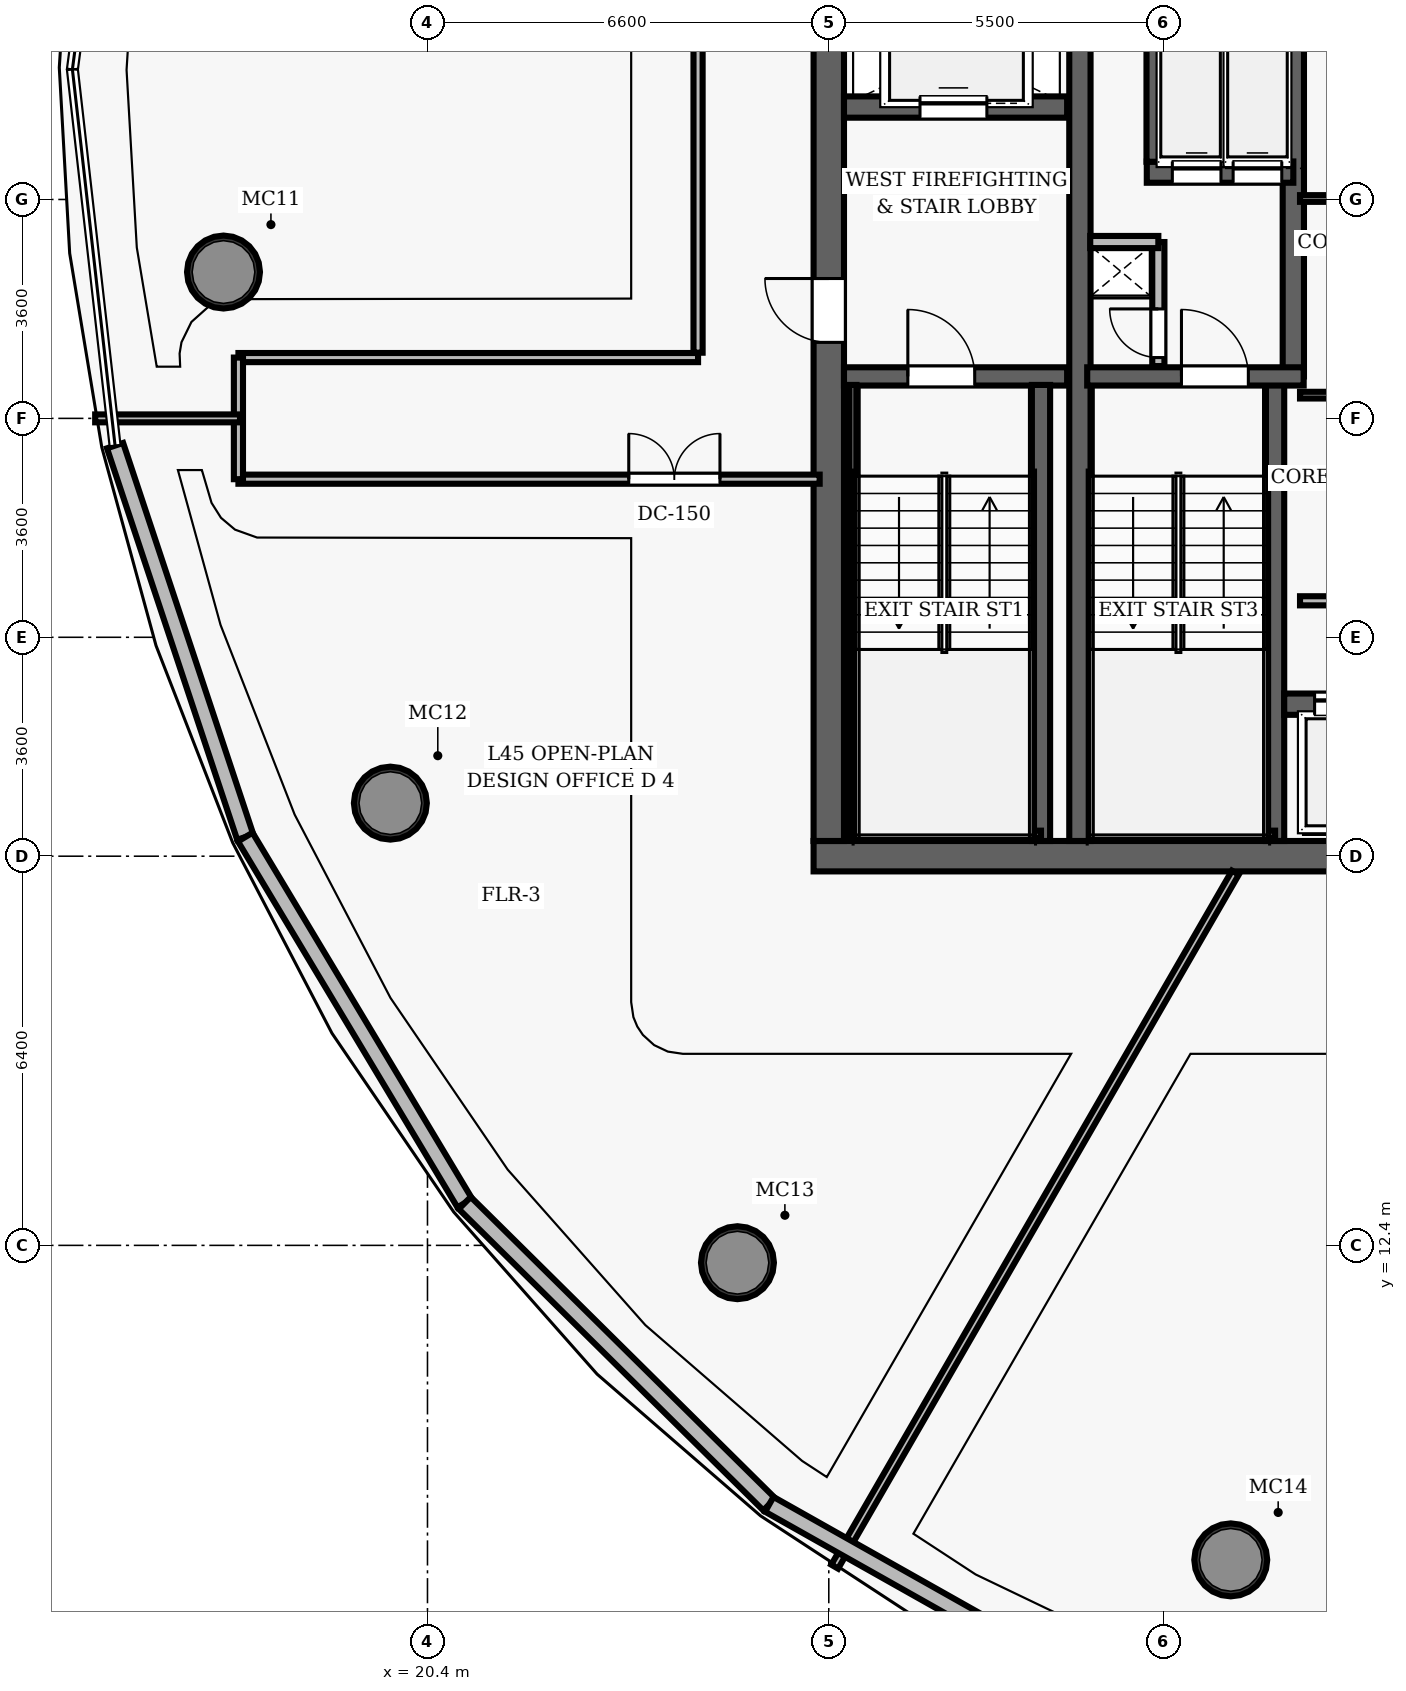
"""IFC4 building model, lengths in metres.
Left out: names, types, materials, properties, quantities, classifications, styles, units other than length and angle.
Written with IfcOpenShell. Run it as: python <this file> out.ifc"""

import sys

from ifc_helpers import new_model, si_unit, direction, frame, frame_2d, origin, origin_2d, place, context, subcontext, project, spatial, rectangle, hollow_circle, extrude, element, fill, save


model = new_model("IFC4")
c1 = context("Model", 3, precision=1e-05, world=origin(), true_north=direction((0.0, 1.0)))
c2 = subcontext(c1, "Body", "Model", "MODEL_VIEW")
j1 = project(units=[si_unit("LENGTHUNIT", "METRE"), si_unit("PLANEANGLEUNIT", "RADIAN")], contexts=[c1])
p1 = place(None, origin())
s1 = spatial("IfcSite", under=j1, at=p1, CompositionType="ELEMENT")
p2 = place(p1, origin())
s2 = spatial("IfcBuilding", under=s1, at=p2, CompositionType="ELEMENT")
p3 = place(p2, frame((0.0, 0.0, 178.9)))
s3 = spatial("IfcBuildingStorey", under=s2, at=p3, CompositionType="ELEMENT", Elevation=178.9)
p4 = place(p3, frame((26.75, 18.8, 0.0), z_axis=(0.0, 0.0, 1.0), x_axis=(1.0, 0.0, 0.0)))
e1 = element("IfcWall", 1, at=p4, inside=s3, PredefinedType="SHEAR", context=c2, shape_type="SweptSolid", body=[
    extrude(rectangle(XDim=22.5, YDim=0.5, at=frame_2d((11.25, 0.0))), origin(), (0.0, 0.0, 1.0), 3.85),
])
p5 = place(p4, frame((14.47, 0.0, 0.0)))
e2 = element("IfcOpeningElement", 2, at=p5, cuts=e1, PredefinedType="OPENING", context=c2, shape_type="SweptSolid", body=[
    extrude(rectangle(XDim=1.05, YDim=2.15, at=frame_2d((0.525, 1.075))), frame((0.0, 0.26, 0.0), z_axis=(0.0, -1.0, 0.0), x_axis=(1.0, 0.0, 0.0)), (0.0, 0.0, 1.0), 0.52),
])
p6 = place(p3, frame((27.0, 19.05, 0.0), z_axis=(0.0, 0.0, 1.0), x_axis=(0.0, 1.0, 0.0)))
e3 = element("IfcWall", 3, at=p6, inside=s3, PredefinedType="SHEAR", context=c2, shape_type="SweptSolid", body=[
    extrude(rectangle(XDim=13.9, YDim=0.5, at=frame_2d((6.95, 0.0))), origin(), (0.0, 0.0, 1.0), 3.85),
])
p7 = place(p6, frame((8.2, 0.0, 0.0)))
e4 = element("IfcOpeningElement", 4, at=p7, cuts=e3, PredefinedType="OPENING", context=c2, shape_type="SweptSolid", body=[
    extrude(rectangle(XDim=1.05, YDim=2.15, at=frame_2d((0.525, 1.075))), frame((0.0, 0.26, 0.0), z_axis=(0.0, -1.0, 0.0), x_axis=(1.0, 0.0, 0.0)), (0.0, 0.0, 1.0), 0.52),
])
p8 = place(p3, frame((31.13, 19.05, 0.0), z_axis=(0.0, 0.0, 1.0), x_axis=(0.0, 1.0, 0.0)))
e5 = element("IfcWall", 5, at=p8, inside=s3, PredefinedType="SHEAR", context=c2, shape_type="SweptSolid", body=[
    extrude(rectangle(XDim=13.9, YDim=0.35, at=frame_2d((6.95, 0.0))), origin(), (0.0, 0.0, 1.0), 3.85),
])
for number, where, z_axis, x_axis in (
    (6, (17.045, 28.406, 0.0), (0.0, 0.0, 1.0), (1.0, 0.0, 0.0)),
    (7, (19.79, 19.673, 0.0), (0.0, 0.0, 1.0), (1.0, 0.0, 0.0)),
    (8, (25.498, 12.115, 0.0), (0.0, 0.0, 1.0), (1.0, 0.0, 0.0)),
    (9, (33.611, 7.228, 0.0), (0.0, 0.0, 1.0), (1.0, 0.0, 0.0)),
):
    element("IfcColumn", number, at=place(p3, frame(where, z_axis=z_axis, x_axis=x_axis)), inside=s3, PredefinedType="COLUMN", context=c2, shape_type="SweptSolid", body=[
        extrude(hollow_circle(Radius=0.6, WallThickness=0.05, at=origin_2d()), origin(), (0.0, 0.0, 1.0), 3.85),
    ])
p9 = place(p3, frame((27.25, 26.69, 0.0), z_axis=(0.0, 0.0, 1.0), x_axis=(1.0, 0.0, 0.0)))
e10 = element("IfcWall", 10, at=p9, inside=s3, PredefinedType="SHEAR", context=c2, shape_type="SweptSolid", body=[
    extrude(rectangle(XDim=3.67, YDim=0.3, at=frame_2d((1.835, 0.0))), origin(), (0.0, 0.0, 1.0), 3.85),
])
p10 = place(p9, frame((1.05, 0.0, 0.0)))
e11 = element("IfcOpeningElement", 11, at=p10, cuts=e10, PredefinedType="OPENING", context=c2, shape_type="SweptSolid", body=[
    extrude(rectangle(XDim=1.1, YDim=2.15, at=frame_2d((0.55, 1.075))), frame((0.0, 0.16, 0.0), z_axis=(0.0, -1.0, 0.0), x_axis=(1.0, 0.0, 0.0)), (0.0, 0.0, 1.0), 0.32),
])
p11 = place(p3, frame((30.49, 19.05, 0.0), z_axis=(0.0, 0.0, 1.0), x_axis=(0.0, 1.0, 0.0)))
e12 = element("IfcWall", 12, at=p11, inside=s3, PredefinedType="SHEAR", context=c2, shape_type="SweptSolid", body=[
    extrude(rectangle(XDim=7.5, YDim=0.3, at=frame_2d((3.75, 0.0))), origin(), (0.0, 0.0, 1.0), 3.85),
])
p12 = place(p3, frame((27.395, 19.1, 0.0), z_axis=(0.0, 0.0, 1.0), x_axis=(0.0, 1.0, 0.0)))
e13 = element("IfcWall", 13, at=p12, inside=s3, PredefinedType="SHEAR", context=c2, shape_type="SweptSolid", body=[
    extrude(rectangle(XDim=7.45, YDim=0.12, at=frame_2d((3.725, 0.0))), origin(), (0.0, 0.0, 1.0), 3.85),
])
p13 = place(p3, frame((27.395, 19.16, 0.0), z_axis=(0.0, 0.0, 1.0), x_axis=(1.0, 0.0, 0.0)))
e14 = element("IfcWall", 14, at=p13, inside=s3, PredefinedType="SHEAR", context=c2, shape_type="SweptSolid", body=[
    extrude(rectangle(XDim=3.095, YDim=0.12, at=frame_2d((1.547, 0.0))), origin(), (0.0, 0.0, 1.0), 3.85),
])
p14 = place(p3, frame((27.25, 31.12, 0.0), z_axis=(0.0, 0.0, 1.0), x_axis=(1.0, 0.0, 0.0)))
e15 = element("IfcWall", 15, at=p14, inside=s3, PredefinedType="SHEAR", context=c2, shape_type="SweptSolid", body=[
    extrude(rectangle(XDim=3.67, YDim=0.35, at=frame_2d((1.835, 0.0))), origin(), (0.0, 0.0, 1.0), 3.035),
])
p15 = place(p14, frame((1.25, 0.0, 0.0)))
e16 = element("IfcOpeningElement", 16, at=p15, cuts=e15, PredefinedType="OPENING", context=c2, shape_type="SweptSolid", body=[
    extrude(rectangle(XDim=1.1, YDim=2.15, at=frame_2d((0.55, 1.075))), frame((0.0, 0.185, 0.0), z_axis=(0.0, -1.0, 0.0), x_axis=(1.0, 0.0, 0.0)), (0.0, 0.0, 1.0), 0.37),
])
p16 = place(p3, frame((34.34, 19.05, 0.0), z_axis=(0.0, 0.0, 1.0), x_axis=(0.0, 1.0, 0.0)))
e17 = element("IfcWall", 17, at=p16, inside=s3, PredefinedType="SHEAR", context=c2, shape_type="SweptSolid", body=[
    extrude(rectangle(XDim=7.5, YDim=0.3, at=frame_2d((3.75, 0.0))), origin(), (0.0, 0.0, 1.0), 3.85),
])
p17 = place(p3, frame((34.64, 26.69, 0.0), z_axis=(0.0, 0.0, 1.0), x_axis=(0.0, 1.0, 0.0)))
e18 = element("IfcWall", 18, at=p17, inside=s3, PredefinedType="SHEAR", context=c2, shape_type="SweptSolid", body=[
    extrude(rectangle(XDim=6.26, YDim=0.35, at=frame_2d((3.13, 0.0))), origin(), (0.0, 0.0, 1.0), 3.85),
])
p18 = place(p3, frame((31.25, 26.69, 0.0), z_axis=(0.0, 0.0, 1.0), x_axis=(1.0, 0.0, 0.0)))
e19 = element("IfcWall", 19, at=p18, inside=s3, PredefinedType="SHEAR", context=c2, shape_type="SweptSolid", body=[
    extrude(rectangle(XDim=3.56, YDim=0.3, at=frame_2d((1.78, 0.0))), origin(), (0.0, 0.0, 1.0), 3.85),
])
p19 = place(p18, frame((1.55, 0.0, 0.0)))
e20 = element("IfcOpeningElement", 20, at=p19, cuts=e19, PredefinedType="OPENING", context=c2, shape_type="SweptSolid", body=[
    extrude(rectangle(XDim=1.1, YDim=2.15, at=frame_2d((0.55, 1.075))), frame((0.0, 0.16, 0.0), z_axis=(0.0, -1.0, 0.0), x_axis=(1.0, 0.0, 0.0)), (0.0, 0.0, 1.0), 0.32),
])
p20 = place(p3, frame((31.3, 19.16, 0.0), z_axis=(0.0, 0.0, 1.0), x_axis=(1.0, 0.0, 0.0)))
e21 = element("IfcWall", 21, at=p20, inside=s3, PredefinedType="SHEAR", context=c2, shape_type="SweptSolid", body=[
    extrude(rectangle(XDim=3.04, YDim=0.12, at=frame_2d((1.52, 0.0))), origin(), (0.0, 0.0, 1.0), 3.85),
])
p21 = place(p3, frame((32.23, 30.05, 0.0), z_axis=(0.0, 0.0, 1.0), x_axis=(1.0, 0.0, 0.0)))
e22 = element("IfcWall", 22, at=p21, inside=s3, PredefinedType="SHEAR", context=c2, shape_type="SweptSolid", body=[
    extrude(rectangle(XDim=2.41, YDim=0.35, at=frame_2d((1.205, 0.0))), origin(), (0.0, 0.0, 1.0), 3.035),
])
p22 = place(p21, frame((0.42, 0.0, 0.0)))
e23 = element("IfcOpeningElement", 23, at=p22, cuts=e22, PredefinedType="OPENING", context=c2, shape_type="SweptSolid", body=[
    extrude(rectangle(XDim=0.8, YDim=2.15, at=frame_2d((0.4, 1.075))), frame((0.0, 0.185, 0.0), z_axis=(0.0, -1.0, 0.0), x_axis=(1.0, 0.0, 0.0)), (0.0, 0.0, 1.0), 0.37),
])
p23 = place(p21, frame((1.42, 0.0, 0.0)))
e24 = element("IfcOpeningElement", 24, at=p23, cuts=e22, PredefinedType="OPENING", context=c2, shape_type="SweptSolid", body=[
    extrude(rectangle(XDim=0.8, YDim=2.15, at=frame_2d((0.4, 1.075))), frame((0.0, 0.185, 0.0), z_axis=(0.0, -1.0, 0.0), x_axis=(1.0, 0.0, 0.0)), (0.0, 0.0, 1.0), 0.37),
])
p24 = place(p3, frame((32.4, 30.22, 0.0), z_axis=(0.0, 0.0, 1.0), x_axis=(0.0, 1.0, 0.0)))
e25 = element("IfcWall", 25, at=p24, inside=s3, PredefinedType="SHEAR", context=c2, shape_type="SweptSolid", body=[
    extrude(rectangle(XDim=2.73, YDim=0.35, at=frame_2d((1.365, 0.0))), origin(), (0.0, 0.0, 1.0), 3.035),
])
p25 = place(p3, frame((32.42, 26.86, 0.0), z_axis=(0.0, 0.0, 1.0), x_axis=(0.0, 1.0, 0.0)))
e26 = element("IfcWall", 26, at=p25, inside=s3, PredefinedType="PARTITIONING", context=c2, shape_type="SweptSolid", body=[
    extrude(rectangle(XDim=2.04, YDim=0.2, at=frame_2d((1.02, 0.0))), origin(), (0.0, 0.0, 1.0), 3.035),
])
p26 = place(p25, frame((0.14, 0.0, 0.0)))
e27 = element("IfcOpeningElement", 27, at=p26, cuts=e26, PredefinedType="OPENING", context=c2, shape_type="SweptSolid", body=[
    extrude(rectangle(XDim=0.8, YDim=2.05, at=frame_2d((0.4, 1.025))), frame((0.0, 0.11, 0.0), z_axis=(0.0, -1.0, 0.0), x_axis=(1.0, 0.0, 0.0)), (0.0, 0.0, 1.0), 0.22),
])
p27 = place(p3, frame((31.3, 28.9, 0.0), z_axis=(0.0, 0.0, 1.0), x_axis=(1.0, 0.0, 0.0)))
e28 = element("IfcWall", 28, at=p27, inside=s3, PredefinedType="PARTITIONING", context=c2, shape_type="SweptSolid", body=[
    extrude(rectangle(XDim=1.12, YDim=0.2, at=frame_2d((0.56, 0.0))), origin(), (0.0, 0.0, 1.0), 3.035),
])
p28 = place(p3, frame((34.49, 21.3, 0.0), z_axis=(0.0, 0.0, 1.0), x_axis=(1.0, 0.0, 0.0)))
e29 = element("IfcWall", 29, at=p28, inside=s3, PredefinedType="SHEAR", context=c2, shape_type="SweptSolid", body=[
    extrude(rectangle(XDim=6.68, YDim=0.35, at=frame_2d((3.34, 0.0))), origin(), (0.0, 0.0, 1.0), 3.035),
])
p29 = place(p28, frame((0.5, 0.0, 0.0)))
e30 = element("IfcOpeningElement", 30, at=p29, cuts=e29, PredefinedType="OPENING", context=c2, shape_type="SweptSolid", body=[
    extrude(rectangle(XDim=0.9, YDim=2.15, at=frame_2d((0.45, 1.075))), frame((0.0, 0.185, 0.0), z_axis=(0.0, -1.0, 0.0), x_axis=(1.0, 0.0, 0.0)), (0.0, 0.0, 1.0), 0.37),
])
p30 = place(p28, frame((2.58, 0.0, 0.0)))
e31 = element("IfcOpeningElement", 31, at=p30, cuts=e29, PredefinedType="OPENING", context=c2, shape_type="SweptSolid", body=[
    extrude(rectangle(XDim=0.9, YDim=2.15, at=frame_2d((0.45, 1.075))), frame((0.0, 0.185, 0.0), z_axis=(0.0, -1.0, 0.0), x_axis=(1.0, 0.0, 0.0)), (0.0, 0.0, 1.0), 0.37),
])
p31 = place(p28, frame((4.66, 0.0, 0.0)))
e32 = element("IfcOpeningElement", 32, at=p31, cuts=e29, PredefinedType="OPENING", context=c2, shape_type="SweptSolid", body=[
    extrude(rectangle(XDim=0.9, YDim=2.15, at=frame_2d((0.45, 1.075))), frame((0.0, 0.185, 0.0), z_axis=(0.0, -1.0, 0.0), x_axis=(1.0, 0.0, 0.0)), (0.0, 0.0, 1.0), 0.37),
])
p32 = place(p3, frame((34.75, 23.0, 0.0), z_axis=(0.0, 0.0, 1.0), x_axis=(1.0, 0.0, 0.0)))
e33 = element("IfcWall", 33, at=p32, inside=s3, PredefinedType="PARTITIONING", context=c2, shape_type="SweptSolid", body=[
    extrude(rectangle(XDim=6.25, YDim=0.15, at=frame_2d((3.125, 0.0))), origin(), (0.0, 0.0, 1.0), 3.035),
])
for number, where, z_axis, x_axis in (
    (34, (34.75, 26.382, 0.0), (0.0, 0.0, 1.0), (1.0, 0.0, 0.0)),
    (35, (34.75, 29.616, 0.0), (0.0, 0.0, 1.0), (1.0, 0.0, 0.0)),
):
    element("IfcWall", number, at=place(p3, frame(where, z_axis=z_axis, x_axis=x_axis)), inside=s3, PredefinedType="PARTITIONING", context=c2, shape_type="SweptSolid", body=[
        extrude(rectangle(XDim=6.25, YDim=0.11, at=frame_2d((3.125, 0.0))), origin(), (0.0, 0.0, 1.0), 3.035),
    ])
p33 = place(p3, frame((24.85, 27.08, 0.0), z_axis=(0.0, 0.0, 1.0), x_axis=(0.0, 1.0, 0.0)))
e36 = element("IfcWall", 36, at=p33, inside=s3, PredefinedType="PARTITIONING", context=c2, shape_type="SweptSolid", body=[
    extrude(rectangle(XDim=8.12, YDim=0.15, at=frame_2d((4.06, 0.0))), origin(), (0.0, 0.0, 1.0), 3.035),
])
p34 = place(p3, frame((17.291, 27.0, 0.0), z_axis=(0.0, 0.0, 1.0), x_axis=(1.0, 0.0, 0.0)))
e37 = element("IfcWall", 37, at=p34, inside=s3, PredefinedType="PARTITIONING", context=c2, shape_type="SweptSolid", body=[
    extrude(rectangle(XDim=7.559, YDim=0.15, at=frame_2d((3.78, 0.0))), origin(), (0.0, 0.0, 1.0), 3.035),
])
p35 = place(p3, frame((17.291, 25.0, 0.0), z_axis=(0.0, 0.0, 1.0), x_axis=(1.0, 0.0, 0.0)))
e38 = element("IfcWall", 38, at=p35, inside=s3, PredefinedType="PARTITIONING", context=c2, shape_type="SweptSolid", body=[
    extrude(rectangle(XDim=9.559, YDim=0.15, at=frame_2d((4.78, 0.0))), origin(), (0.0, 0.0, 1.0), 3.035),
])
p36 = place(p35, frame((6.419, 0.0, 0.0)))
e39 = element("IfcOpeningElement", 39, at=p36, cuts=e38, PredefinedType="OPENING", context=c2, shape_type="SweptSolid", body=[
    extrude(rectangle(XDim=1.5, YDim=2.2, at=frame_2d((0.75, 1.1))), frame((0.0, 0.085, 0.0), z_axis=(0.0, -1.0, 0.0), x_axis=(1.0, 0.0, 0.0)), (0.0, 0.0, 1.0), 0.17),
])
p37 = place(p3, frame((17.291, 25.0, 0.0), z_axis=(0.0, 0.0, 1.0), x_axis=(0.0, 1.0, 0.0)))
e40 = element("IfcWall", 40, at=p37, inside=s3, PredefinedType="PARTITIONING", context=c2, shape_type="SweptSolid", body=[
    extrude(rectangle(XDim=2.0, YDim=0.15, at=frame_2d((1.0, 0.0))), origin(), (0.0, 0.0, 1.0), 3.035),
])
p38 = place(p3, frame((17.317, 26.0, 0.0), z_axis=(0.0, 0.0, 1.0), x_axis=(-1.0, 0.0, 0.0)))
e41 = element("IfcWall", 41, at=p38, inside=s3, PredefinedType="PARTITIONING", context=c2, shape_type="SweptSolid", body=[
    extrude(rectangle(XDim=2.382, YDim=0.13, at=frame_2d((1.191, 0.0))), origin(), (0.0, 0.0, 1.0), 3.035),
])
p39 = place(p3, frame((33.687, 18.53, 0.0), z_axis=(0.0, 0.0, 1.0), x_axis=(-0.499996112969, -0.866027647951, 0.0)))
e42 = element("IfcWall", 42, at=p39, inside=s3, PredefinedType="PARTITIONING", context=c2, shape_type="SweptSolid", body=[
    extrude(rectangle(XDim=13.18, YDim=0.13, at=frame_2d((6.59, 0.0))), origin(), (0.0, 0.0, 1.0), 3.035),
])
p40 = place(p3, frame((17.403, 19.115, 0.0), z_axis=(0.0, 0.0, 1.0), x_axis=(-0.315590755591, 0.948895397283, 0.0)))
e43 = element("IfcWall", 43, at=p40, inside=s3, PredefinedType="SOLIDWALL", context=c2, shape_type="SweptSolid", body=[
    extrude(rectangle(XDim=6.784, YDim=0.28, at=frame_2d((3.392, 0.0))), origin(), (0.0, 0.0, 1.0), 3.62),
])
p41 = place(p3, frame((21.013, 13.097, 0.0), z_axis=(0.0, 0.0, 1.0), x_axis=(-0.514434360632, 0.857529759601, 0.0)))
e44 = element("IfcWall", 44, at=p41, inside=s3, PredefinedType="SOLIDWALL", context=c2, shape_type="SweptSolid", body=[
    extrude(rectangle(XDim=7.018, YDim=0.28, at=frame_2d((3.509, 0.0))), origin(), (0.0, 0.0, 1.0), 3.62),
])
p42 = place(p3, frame((26.021, 8.141, 0.0), z_axis=(0.0, 0.0, 1.0), x_axis=(-0.710839231307, 0.703354524572, 0.0)))
e45 = element("IfcWall", 45, at=p42, inside=s3, PredefinedType="SOLIDWALL", context=c2, shape_type="SweptSolid", body=[
    extrude(rectangle(XDim=7.046, YDim=0.28, at=frame_2d((3.523, 0.0))), origin(), (0.0, 0.0, 1.0), 3.62),
])
p43 = place(p3, frame((32.159, 4.682, 0.0), z_axis=(0.0, 0.0, 1.0), x_axis=(-0.871187511023, 0.490950425845, 0.0)))
e46 = element("IfcWall", 46, at=p43, inside=s3, PredefinedType="SOLIDWALL", context=c2, shape_type="SweptSolid", body=[
    extrude(rectangle(XDim=7.045, YDim=0.28, at=frame_2d((3.523, 0.0))), origin(), (0.0, 0.0, 1.0), 3.62),
])
p44 = place(p10, origin())
e47 = element("IfcDoor", 47, at=p44, inside=s3, OperationType="SINGLE_SWING_LEFT", PredefinedType="DOOR", context=c2, shape_type="SweptSolid", body=[
    extrude(rectangle(XDim=1.1, YDim=2.15, at=frame_2d((0.55, 1.075))), frame((0.0, 0.025, 0.0), z_axis=(0.0, -1.0, 0.0), x_axis=(1.0, 0.0, 0.0)), (0.0, 0.0, 1.0), 0.05),
])
fill(e11, e47)
p45 = place(p7, origin())
e48 = element("IfcDoor", 48, at=p45, inside=s3, OperationType="SINGLE_SWING_RIGHT", PredefinedType="DOOR", context=c2, shape_type="SweptSolid", body=[
    extrude(rectangle(XDim=1.05, YDim=2.15, at=frame_2d((0.525, 1.075))), frame((0.0, 0.025, 0.0), z_axis=(0.0, -1.0, 0.0), x_axis=(1.0, 0.0, 0.0)), (0.0, 0.0, 1.0), 0.05),
])
fill(e4, e48)
p46 = place(p19, origin())
e49 = element("IfcDoor", 49, at=p46, inside=s3, OperationType="SINGLE_SWING_LEFT", PredefinedType="DOOR", context=c2, shape_type="SweptSolid", body=[
    extrude(rectangle(XDim=1.1, YDim=2.15, at=frame_2d((0.55, 1.075))), frame((0.0, 0.025, 0.0), z_axis=(0.0, -1.0, 0.0), x_axis=(1.0, 0.0, 0.0)), (0.0, 0.0, 1.0), 0.05),
])
fill(e20, e49)
p47 = place(p26, origin())
e50 = element("IfcDoor", 50, at=p47, inside=s3, OperationType="SINGLE_SWING_RIGHT", PredefinedType="DOOR", context=c2, shape_type="SweptSolid", body=[
    extrude(rectangle(XDim=0.8, YDim=2.05, at=frame_2d((0.4, 1.025))), frame((0.0, 0.025, 0.0), z_axis=(0.0, -1.0, 0.0), x_axis=(1.0, 0.0, 0.0)), (0.0, 0.0, 1.0), 0.05),
])
fill(e27, e50)
p48 = place(p36, origin())
e51 = element("IfcDoor", 51, at=p48, inside=s3, OperationType="DOUBLE_DOOR_SINGLE_SWING", PredefinedType="DOOR", context=c2, shape_type="SweptSolid", body=[
    extrude(rectangle(XDim=1.5, YDim=2.2, at=frame_2d((0.75, 1.1))), frame((0.0, 0.025, 0.0), z_axis=(0.0, -1.0, 0.0), x_axis=(1.0, 0.0, 0.0)), (0.0, 0.0, 1.0), 0.05),
])
fill(e39, e51)
p49 = place(p29, origin())
e52 = element("IfcDoor", 52, at=p49, inside=s3, OperationType="SLIDING_TO_LEFT", PredefinedType="DOOR", context=c2, shape_type="SweptSolid", body=[
    extrude(rectangle(XDim=0.9, YDim=2.15, at=frame_2d((0.45, 1.075))), frame((0.0, 0.025, 0.0), z_axis=(0.0, -1.0, 0.0), x_axis=(1.0, 0.0, 0.0)), (0.0, 0.0, 1.0), 0.05),
])
fill(e30, e52)
p50 = place(p15, origin())
e53 = element("IfcDoor", 53, at=p50, inside=s3, OperationType="SLIDING_TO_LEFT", PredefinedType="DOOR", context=c2, shape_type="SweptSolid", body=[
    extrude(rectangle(XDim=1.1, YDim=2.15, at=frame_2d((0.55, 1.075))), frame((0.0, 0.025, 0.0), z_axis=(0.0, -1.0, 0.0), x_axis=(1.0, 0.0, 0.0)), (0.0, 0.0, 1.0), 0.05),
])
fill(e16, e53)
p51 = place(p22, origin())
e54 = element("IfcDoor", 54, at=p51, inside=s3, OperationType="SLIDING_TO_LEFT", PredefinedType="DOOR", context=c2, shape_type="SweptSolid", body=[
    extrude(rectangle(XDim=0.8, YDim=2.15, at=frame_2d((0.4, 1.075))), frame((0.0, 0.025, 0.0), z_axis=(0.0, -1.0, 0.0), x_axis=(1.0, 0.0, 0.0)), (0.0, 0.0, 1.0), 0.05),
])
fill(e23, e54)
p52 = place(p23, origin())
e55 = element("IfcDoor", 55, at=p52, inside=s3, OperationType="SLIDING_TO_LEFT", PredefinedType="DOOR", context=c2, shape_type="SweptSolid", body=[
    extrude(rectangle(XDim=0.8, YDim=2.15, at=frame_2d((0.4, 1.075))), frame((0.0, 0.025, 0.0), z_axis=(0.0, -1.0, 0.0), x_axis=(1.0, 0.0, 0.0)), (0.0, 0.0, 1.0), 0.05),
])
fill(e24, e55)
save(model, sys.argv[1])
